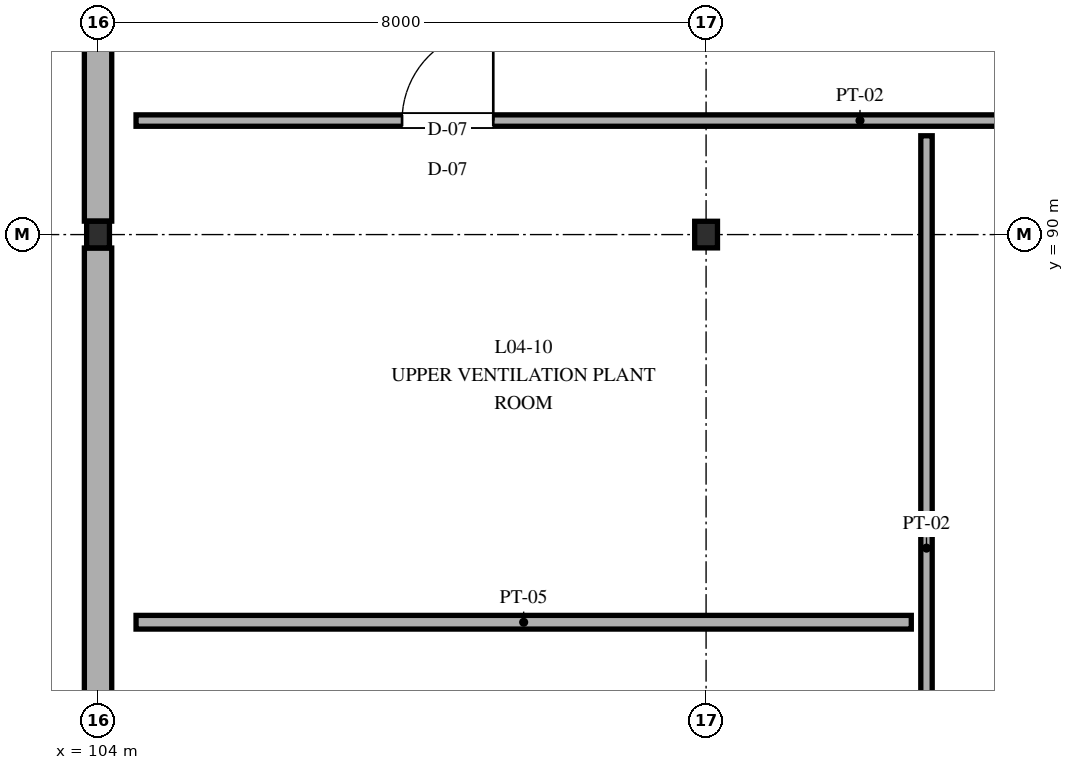
"""IFC4 building model, lengths in metres.
Left out: names, types, materials, properties, quantities, classifications, styles, units other than length and angle.
Written with IfcOpenShell. Run it as: python <this file> out.ifc"""

import sys

from ifc_helpers import new_model, si_unit, direction, frame, frame_2d, origin, origin_2d, place, context, subcontext, project, spatial, rectangle, i_section, extrude, element, fill, save


model = new_model("IFC4")
c1 = context("Model", 3, precision=1e-05, world=origin(), true_north=direction((0.0, 1.0)))
c2 = subcontext(c1, "Body", "Model", "MODEL_VIEW")
j1 = project(units=[si_unit("LENGTHUNIT", "METRE"), si_unit("PLANEANGLEUNIT", "RADIAN")], contexts=[c1])
p1 = place(None, origin())
s1 = spatial("IfcSite", under=j1, at=p1, CompositionType="ELEMENT")
p2 = place(p1, origin())
s2 = spatial("IfcBuilding", under=s1, at=p2, CompositionType="ELEMENT")
p3 = place(p2, frame((0.0, 0.0, 18.6)))
s3 = spatial("IfcBuildingStorey", under=s2, at=p3, CompositionType="ELEMENT", Elevation=18.6)
for number, where, z_axis, x_axis in (
    (1, (104.0, 90.0, 0.0), (0.0, 0.0, 1.0), (1.0, 0.0, 0.0)),
    (2, (112.0, 90.0, 0.0), (0.0, 0.0, 1.0), (1.0, 0.0, 0.0)),
):
    element("IfcColumn", number, at=place(p3, frame(where, z_axis=z_axis, x_axis=x_axis)), inside=s3, PredefinedType="COLUMN", context=c2, shape_type="SweptSolid", body=[
        extrude(i_section(OverallWidth=0.3, OverallDepth=0.35, WebThickness=0.01, FlangeThickness=0.018, FilletRadius=0.027, at=origin_2d()), origin(), (0.0, 0.0, 1.0), 3.6),
    ])
for number, where, z_axis, x_axis in (
    (3, (104.0, 89.823, 0.0), (0.0, 0.0, 1.0), (0.0, -1.0, 0.0)),
    (4, (104.0, 97.823, 0.0), (0.0, 0.0, 1.0), (0.0, -1.0, 0.0)),
):
    element("IfcWall", number, at=place(p3, frame(where, z_axis=z_axis, x_axis=x_axis)), inside=s3, PredefinedType="STANDARD", context=c2, shape_type="SweptSolid", body=[
        extrude(rectangle(XDim=7.646, YDim=0.36, at=frame_2d((3.823, 0.0))), origin(), (0.0, 0.0, 1.0), 3.05),
    ])
p4 = place(p3, frame((104.5, 91.5, 0.0), z_axis=(0.0, 0.0, 1.0), x_axis=(1.0, 0.0, 0.0)))
e5 = element("IfcWall", 5, at=p4, inside=s3, PredefinedType="PARTITIONING", context=c2, shape_type="SweptSolid", body=[
    extrude(rectangle(XDim=31.0, YDim=0.15, at=frame_2d((15.5, 0.0))), origin(), (0.0, 0.0, 1.0), 3.05),
])
p5 = place(p4, frame((3.5, 0.0, 0.0)))
e6 = element("IfcOpeningElement", 6, at=p5, cuts=e5, PredefinedType="OPENING", context=c2, shape_type="SweptSolid", body=[
    extrude(rectangle(XDim=1.2, YDim=2.2, at=frame_2d((0.6, 1.1))), frame((0.0, 0.085, 0.0), z_axis=(0.0, -1.0, 0.0), x_axis=(1.0, 0.0, 0.0)), (0.0, 0.0, 1.0), 0.17),
])
p6 = place(p4, frame((16.5, 0.0, 0.0)))
e7 = element("IfcOpeningElement", 7, at=p6, cuts=e5, PredefinedType="OPENING", context=c2, shape_type="SweptSolid", body=[
    extrude(rectangle(XDim=1.0, YDim=2.15, at=frame_2d((0.5, 1.075))), frame((0.0, 0.085, 0.0), z_axis=(0.0, -1.0, 0.0), x_axis=(1.0, 0.0, 0.0)), (0.0, 0.0, 1.0), 0.17),
])
p7 = place(p4, frame((25.5, 0.0, 0.0)))
e8 = element("IfcOpeningElement", 8, at=p7, cuts=e5, PredefinedType="OPENING", context=c2, shape_type="SweptSolid", body=[
    extrude(rectangle(XDim=1.35, YDim=2.2, at=frame_2d((0.675, 1.1))), frame((0.0, 0.085, 0.0), z_axis=(0.0, -1.0, 0.0), x_axis=(1.0, 0.0, 0.0)), (0.0, 0.0, 1.0), 0.17),
])
p8 = place(p3, frame((114.9, 74.5, 0.0), z_axis=(0.0, 0.0, 1.0), x_axis=(0.0, 1.0, 0.0)))
e9 = element("IfcWall", 9, at=p8, inside=s3, PredefinedType="PARTITIONING", context=c2, shape_type="SweptSolid", body=[
    extrude(rectangle(XDim=16.8, YDim=0.15, at=frame_2d((8.4, 0.0))), origin(), (0.0, 0.0, 1.0), 3.05),
])
p9 = place(p8, frame((4.5, 0.0, 0.0)))
e10 = element("IfcOpeningElement", 10, at=p9, cuts=e9, PredefinedType="OPENING", context=c2, shape_type="SweptSolid", body=[
    extrude(rectangle(XDim=1.1, YDim=2.2, at=frame_2d((0.55, 1.1))), frame((0.0, 0.085, 0.0), z_axis=(0.0, -1.0, 0.0), x_axis=(1.0, 0.0, 0.0)), (0.0, 0.0, 1.0), 0.17),
])
p10 = place(p3, frame((104.5, 84.9, 0.0), z_axis=(0.0, 0.0, 1.0), x_axis=(1.0, 0.0, 0.0)))
e11 = element("IfcWall", 11, at=p10, inside=s3, PredefinedType="PARTITIONING", context=c2, shape_type="SweptSolid", body=[
    extrude(rectangle(XDim=10.2, YDim=0.18, at=frame_2d((5.1, 0.0))), origin(), (0.0, 0.0, 1.0), 3.05),
])
p11 = place(p5, origin())
e12 = element("IfcDoor", 12, at=p11, inside=s3, OperationType="SINGLE_SWING_RIGHT", PredefinedType="DOOR", context=c2, shape_type="SweptSolid", body=[
    extrude(rectangle(XDim=1.2, YDim=2.2, at=frame_2d((0.6, 1.1))), frame((0.0, 0.025, 0.0), z_axis=(0.0, -1.0, 0.0), x_axis=(1.0, 0.0, 0.0)), (0.0, 0.0, 1.0), 0.05),
])
fill(e6, e12)
save(model, sys.argv[1])
